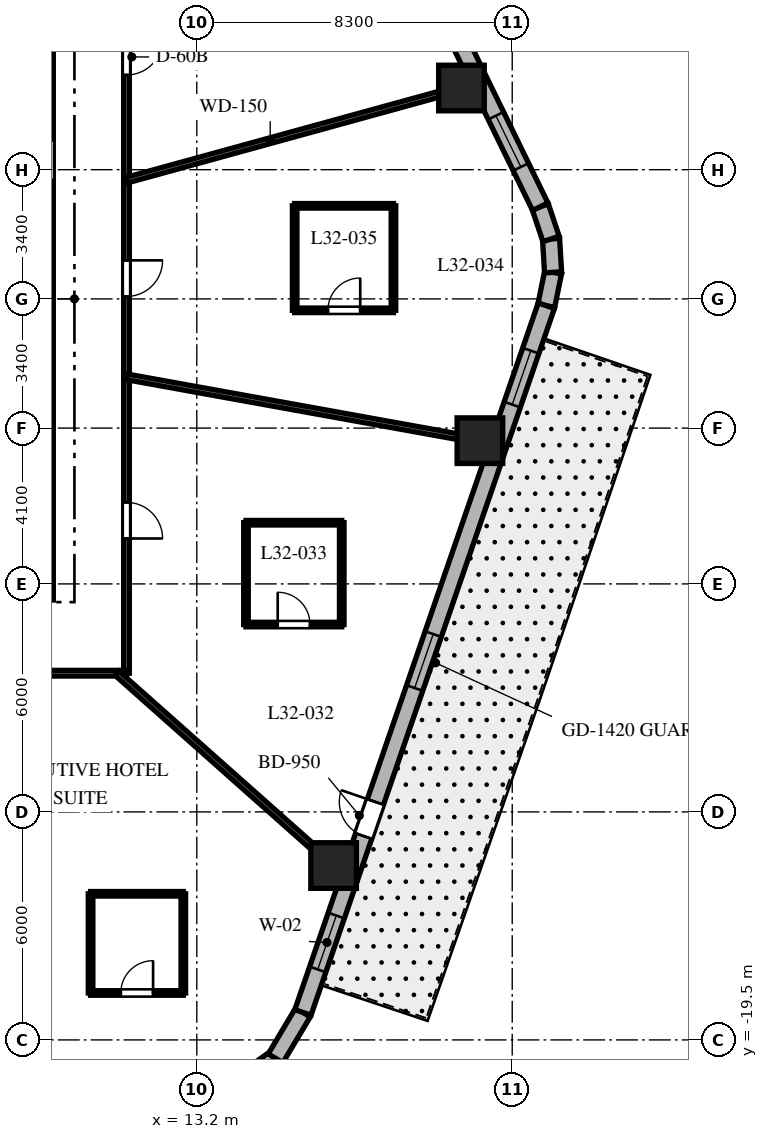
"""IFC4 building model, lengths in metres.
Left out: names, types, materials, properties, quantities, classifications, styles, units other than length and angle.
Written with IfcOpenShell. Run it as: python <this file> out.ifc"""

import sys

from ifc_helpers import new_model, si_unit, direction, frame, frame_2d, origin, origin_2d, place, context, subcontext, project, spatial, rectangle, extrude, element, fill, save


model = new_model("IFC4")
c1 = context("Model", 3, precision=1e-05, world=origin(), true_north=direction((0.0, 1.0)))
c2 = subcontext(c1, "Body", "Model", "MODEL_VIEW")
j1 = project(units=[si_unit("LENGTHUNIT", "METRE"), si_unit("PLANEANGLEUNIT", "RADIAN")], contexts=[c1])
p1 = place(None, origin())
s1 = spatial("IfcSite", under=j1, at=p1, CompositionType="ELEMENT")
p2 = place(p1, origin())
s2 = spatial("IfcBuilding", under=s1, at=p2, CompositionType="ELEMENT")
p3 = place(p2, frame((0.0, 0.0, 132.1)))
s3 = spatial("IfcBuildingStorey", under=s2, at=p3, CompositionType="ELEMENT", Elevation=132.1)
p4 = place(p3, frame((-9.425, -7.5, 0.0), z_axis=(0.0, 0.0, 1.0), x_axis=(1.0, 0.0, 0.0)))
e1 = element("IfcWall", 1, at=p4, inside=s3, PredefinedType="SHEAR", context=c2, shape_type="SweptSolid", body=[
    extrude(rectangle(XDim=18.85, YDim=0.85, at=frame_2d((9.425, 0.0))), origin(), (0.0, 0.0, 1.0), 3.7),
])
p5 = place(p4, frame((9.475, 0.0, 0.0)))
e2 = element("IfcOpeningElement", 2, at=p5, cuts=e1, PredefinedType="OPENING", context=c2, shape_type="SweptSolid", body=[
    extrude(rectangle(XDim=1.0, YDim=2.15, at=frame_2d((0.5, 1.075))), frame((0.0, 0.435, 0.0), z_axis=(0.0, -1.0, 0.0), x_axis=(1.0, 0.0, 0.0)), (0.0, 0.0, 1.0), 0.87),
])
p6 = place(p3, frame((9.0, -7.075, 0.0), z_axis=(0.0, 0.0, 1.0), x_axis=(0.0, 1.0, 0.0)))
e3 = element("IfcWall", 3, at=p6, inside=s3, PredefinedType="SHEAR", context=c2, shape_type="SweptSolid", body=[
    extrude(rectangle(XDim=14.15, YDim=0.85, at=frame_2d((7.075, 0.0))), origin(), (0.0, 0.0, 1.0), 3.7),
])
p7 = place(p6, frame((10.2, 0.0, 0.0)))
e4 = element("IfcOpeningElement", 4, at=p7, cuts=e3, PredefinedType="OPENING", context=c2, shape_type="SweptSolid", body=[
    extrude(rectangle(XDim=1.05, YDim=2.15, at=frame_2d((0.525, 1.075))), frame((0.0, 0.435, 0.0), z_axis=(0.0, -1.0, 0.0), x_axis=(1.0, 0.0, 0.0)), (0.0, 0.0, 1.0), 0.87),
])
for number, where, z_axis, x_axis in (
    (5, (16.8, -14.911, 0.0), (0.0, 0.0, 1.0), (1.0, 0.0, 0.0)),
    (6, (20.65, -3.731, 0.0), (0.0, 0.0, 1.0), (1.0, 0.0, 0.0)),
    (7, (20.164, 5.549, 0.0), (0.0, 0.0, 1.0), (1.0, 0.0, 0.0)),
):
    element("IfcColumn", number, at=place(p3, frame(where, z_axis=z_axis, x_axis=x_axis)), inside=s3, PredefinedType="COLUMN", context=c2, shape_type="SweptSolid", body=[
        extrude(rectangle(XDim=1.2, YDim=1.2, at=origin_2d()), origin(), (0.0, 0.0, 1.0), 3.7),
    ])
p8 = place(p3, frame((14.146, -20.787, 0.0), z_axis=(0.0, 0.0, 1.0), x_axis=(0.814162929117, 0.580636482536, 0.0)))
e8 = element("IfcWall", 8, at=p8, inside=s3, PredefinedType="SOLIDWALL", context=c2, shape_type="SweptSolid", body=[
    extrude(rectangle(XDim=1.382, YDim=0.45, at=frame_2d((0.691, 0.0))), origin(), (0.0, 0.0, 1.0), 3.4),
])
p9 = place(p3, frame((15.272, -19.984, 0.0), z_axis=(0.0, 0.0, 1.0), x_axis=(0.512579347361, 0.858639862025, 0.0)))
e9 = element("IfcWall", 9, at=p9, inside=s3, PredefinedType="SOLIDWALL", context=c2, shape_type="SweptSolid", body=[
    extrude(rectangle(XDim=1.406, YDim=0.45, at=frame_2d((0.703, 0.0))), origin(), (0.0, 0.0, 1.0), 3.4),
])
p10 = place(p3, frame((22.397, -0.179, 0.0), z_axis=(0.0, 0.0, 1.0), x_axis=(0.199313589404, 0.979935759669, 0.0)))
e10 = element("IfcWall", 10, at=p10, inside=s3, PredefinedType="SOLIDWALL", context=c2, shape_type="SweptSolid", body=[
    extrude(rectangle(XDim=0.896, YDim=0.45, at=frame_2d((0.448, 0.0))), origin(), (0.0, 0.0, 1.0), 3.4),
])
p11 = place(p3, frame((22.575, 0.698, 0.0), z_axis=(0.0, 0.0, 1.0), x_axis=(-0.060980441946, 0.998138961117, 0.0)))
e11 = element("IfcWall", 11, at=p11, inside=s3, PredefinedType="SOLIDWALL", context=c2, shape_type="SweptSolid", body=[
    extrude(rectangle(XDim=0.881, YDim=0.45, at=frame_2d((0.44, 0.0))), origin(), (0.0, 0.0, 1.0), 3.4),
])
p12 = place(p3, frame((22.522, 1.577, 0.0), z_axis=(0.0, 0.0, 1.0), x_axis=(-0.317372694837, 0.948300887151, 0.0)))
e12 = element("IfcWall", 12, at=p12, inside=s3, PredefinedType="SOLIDWALL", context=c2, shape_type="SweptSolid", body=[
    extrude(rectangle(XDim=0.896, YDim=0.45, at=frame_2d((0.448, 0.0))), origin(), (0.0, 0.0, 1.0), 3.4),
])
p13 = place(p3, frame((15.992, -18.777, 0.0), z_axis=(0.0, 0.0, 1.0), x_axis=(0.325606988926, 0.945505202927, 0.0)))
e13 = element("IfcWall", 13, at=p13, inside=s3, PredefinedType="SOLIDWALL", context=c2, shape_type="SweptSolid", body=[
    extrude(rectangle(XDim=19.669, YDim=0.45, at=frame_2d((9.835, 0.0))), origin(), (0.0, 0.0, 1.0), 3.4),
])
p14 = place(p13, frame((4.909, 0.0, 0.0)))
e14 = element("IfcOpeningElement", 14, at=p14, cuts=e13, PredefinedType="OPENING", context=c2, shape_type="SweptSolid", body=[
    extrude(rectangle(XDim=0.95, YDim=2.15, at=frame_2d((0.475, 1.075))), frame((0.0, 0.235, 0.0), z_axis=(0.0, -1.0, 0.0), x_axis=(1.0, 0.0, 0.0)), (0.0, 0.0, 1.0), 0.47),
])
p15 = place(p13, frame((1.197, 0.0, 0.8)))
e15 = element("IfcOpeningElement", 15, at=p15, cuts=e13, PredefinedType="OPENING", context=c2, shape_type="SweptSolid", body=[
    extrude(rectangle(XDim=1.5, YDim=1.8, at=frame_2d((0.75, 0.9))), frame((0.0, 0.235, 0.0), z_axis=(0.0, -1.0, 0.0), x_axis=(1.0, 0.0, 0.0)), (0.0, 0.0, 1.0), 0.47),
])
p16 = place(p13, frame((9.03, 0.0, 0.8)))
e16 = element("IfcOpeningElement", 16, at=p16, cuts=e13, PredefinedType="OPENING", context=c2, shape_type="SweptSolid", body=[
    extrude(rectangle(XDim=1.5, YDim=1.8, at=frame_2d((0.75, 0.9))), frame((0.0, 0.235, 0.0), z_axis=(0.0, -1.0, 0.0), x_axis=(1.0, 0.0, 0.0)), (0.0, 0.0, 1.0), 0.47),
])
p17 = place(p13, frame((16.918, 0.0, 0.8)))
e17 = element("IfcOpeningElement", 17, at=p17, cuts=e13, PredefinedType="OPENING", context=c2, shape_type="SweptSolid", body=[
    extrude(rectangle(XDim=1.5, YDim=1.8, at=frame_2d((0.75, 0.9))), frame((0.0, 0.235, 0.0), z_axis=(0.0, -1.0, 0.0), x_axis=(1.0, 0.0, 0.0)), (0.0, 0.0, 1.0), 0.47),
])
p18 = place(p3, frame((22.238, 2.427, 0.0), z_axis=(0.0, 0.0, 1.0), x_axis=(-0.438374803278, 0.898792262901, 0.0)))
e18 = element("IfcWall", 18, at=p18, inside=s3, PredefinedType="SOLIDWALL", context=c2, shape_type="SweptSolid", body=[
    extrude(rectangle(XDim=18.618, YDim=0.45, at=frame_2d((9.309, 0.0))), origin(), (0.0, 0.0, 1.0), 3.4),
])
p19 = place(p18, frame((8.61, 0.0, 0.8)))
e19 = element("IfcOpeningElement", 19, at=p19, cuts=e18, PredefinedType="OPENING", context=c2, shape_type="SweptSolid", body=[
    extrude(rectangle(XDim=1.5, YDim=1.8, at=frame_2d((0.75, 0.9))), frame((0.0, 0.235, 0.0), z_axis=(0.0, -1.0, 0.0), x_axis=(1.0, 0.0, 0.0)), (0.0, 0.0, 1.0), 0.47),
])
p20 = place(p18, frame((16.006, 0.0, 0.8)))
e20 = element("IfcOpeningElement", 20, at=p20, cuts=e18, PredefinedType="OPENING", context=c2, shape_type="SweptSolid", body=[
    extrude(rectangle(XDim=1.5, YDim=1.8, at=frame_2d((0.75, 0.9))), frame((0.0, 0.235, 0.0), z_axis=(0.0, -1.0, 0.0), x_axis=(1.0, 0.0, 0.0)), (0.0, 0.0, 1.0), 0.47),
])
p21 = place(p18, frame((1.163, 0.0, 0.8)))
e21 = element("IfcOpeningElement", 21, at=p21, cuts=e18, PredefinedType="OPENING", context=c2, shape_type="SweptSolid", body=[
    extrude(rectangle(XDim=1.5, YDim=1.8, at=frame_2d((0.75, 0.9))), frame((0.0, 0.235, 0.0), z_axis=(0.0, -1.0, 0.0), x_axis=(1.0, 0.0, 0.0)), (0.0, 0.0, 1.0), 0.47),
])
p22 = place(p3, frame((11.35, 9.85, 0.0), z_axis=(0.0, 0.0, 1.0), x_axis=(0.0, -1.0, 0.0)))
e22 = element("IfcWall", 22, at=p22, inside=s3, PredefinedType="PARTITIONING", context=c2, shape_type="SweptSolid", body=[
    extrude(rectangle(XDim=19.7, YDim=0.15, at=frame_2d((9.85, 0.0))), origin(), (0.0, 0.0, 1.0), 2.84),
])
p23 = place(p22, frame((3.008, 0.0, 0.0)))
e23 = element("IfcOpeningElement", 23, at=p23, cuts=e22, PredefinedType="OPENING", context=c2, shape_type="SweptSolid", body=[
    extrude(rectangle(XDim=0.95, YDim=2.03, at=frame_2d((0.475, 1.015))), frame((0.0, 0.085, 0.0), z_axis=(0.0, -1.0, 0.0), x_axis=(1.0, 0.0, 0.0)), (0.0, 0.0, 1.0), 0.17),
])
p24 = place(p22, frame((15.205, 0.0, 0.0)))
e24 = element("IfcOpeningElement", 24, at=p24, cuts=e22, PredefinedType="OPENING", context=c2, shape_type="SweptSolid", body=[
    extrude(rectangle(XDim=0.95, YDim=2.03, at=frame_2d((0.475, 1.015))), frame((0.0, 0.085, 0.0), z_axis=(0.0, -1.0, 0.0), x_axis=(1.0, 0.0, 0.0)), (0.0, 0.0, 1.0), 0.17),
])
p25 = place(p22, frame((8.836, 0.0, 0.0)))
e25 = element("IfcOpeningElement", 25, at=p25, cuts=e22, PredefinedType="OPENING", context=c2, shape_type="SweptSolid", body=[
    extrude(rectangle(XDim=0.95, YDim=2.03, at=frame_2d((0.475, 1.015))), frame((0.0, 0.085, 0.0), z_axis=(0.0, -1.0, 0.0), x_axis=(1.0, 0.0, 0.0)), (0.0, 0.0, 1.0), 0.17),
])
p26 = place(p3, frame((11.35, -9.85, 0.0), z_axis=(0.0, 0.0, 1.0), x_axis=(-1.0, 0.0, 0.0)))
e26 = element("IfcWall", 26, at=p26, inside=s3, PredefinedType="PARTITIONING", context=c2, shape_type="SweptSolid", body=[
    extrude(rectangle(XDim=22.7, YDim=0.15, at=frame_2d((11.35, 0.0))), origin(), (0.0, 0.0, 1.0), 2.84),
])
p27 = place(p26, frame((17.237, 0.0, 0.0)))
e27 = element("IfcOpeningElement", 27, at=p27, cuts=e26, PredefinedType="OPENING", context=c2, shape_type="SweptSolid", body=[
    extrude(rectangle(XDim=0.95, YDim=2.03, at=frame_2d((0.475, 1.015))), frame((0.0, 0.085, 0.0), z_axis=(0.0, -1.0, 0.0), x_axis=(1.0, 0.0, 0.0)), (0.0, 0.0, 1.0), 0.17),
])
p28 = place(p26, frame((10.45, 0.0, 0.0)))
e28 = element("IfcOpeningElement", 28, at=p28, cuts=e26, PredefinedType="OPENING", context=c2, shape_type="SweptSolid", body=[
    extrude(rectangle(XDim=0.95, YDim=2.03, at=frame_2d((0.475, 1.015))), frame((0.0, 0.085, 0.0), z_axis=(0.0, -1.0, 0.0), x_axis=(1.0, 0.0, 0.0)), (0.0, 0.0, 1.0), 0.17),
])
p29 = place(p26, frame((3.399, 0.0, 0.0)))
e29 = element("IfcOpeningElement", 29, at=p29, cuts=e26, PredefinedType="OPENING", context=c2, shape_type="SweptSolid", body=[
    extrude(rectangle(XDim=0.95, YDim=2.03, at=frame_2d((0.475, 1.015))), frame((0.0, 0.085, 0.0), z_axis=(0.0, -1.0, 0.0), x_axis=(1.0, 0.0, 0.0)), (0.0, 0.0, 1.0), 0.17),
])
p30 = place(p3, frame((11.35, 3.123, 0.0), z_axis=(0.0, 0.0, 1.0), x_axis=(0.964151983214, 0.265350623261, 0.0)))
e30 = element("IfcWall", 30, at=p30, inside=s3, PredefinedType="PARTITIONING", context=c2, shape_type="SweptSolid", body=[
    extrude(rectangle(XDim=9.645, YDim=0.15, at=frame_2d((4.823, 0.0))), origin(), (0.0, 0.0, 1.0), 2.54),
])
p31 = place(p3, frame((11.098, -9.85, 0.0), z_axis=(0.0, 0.0, 1.0), x_axis=(0.747904295103, -0.663806572253, 0.0)))
e31 = element("IfcWall", 31, at=p31, inside=s3, PredefinedType="PARTITIONING", context=c2, shape_type="SweptSolid", body=[
    extrude(rectangle(XDim=8.16, YDim=0.15, at=frame_2d((4.08, 0.0))), origin(), (0.0, 0.0, 1.0), 2.54),
])
p32 = place(p3, frame((11.35, -2.051, 0.0), z_axis=(0.0, 0.0, 1.0), x_axis=(0.984068313063, -0.177790762484, 0.0)))
e32 = element("IfcWall", 32, at=p32, inside=s3, PredefinedType="PARTITIONING", context=c2, shape_type="SweptSolid", body=[
    extrude(rectangle(XDim=9.951, YDim=0.15, at=frame_2d((4.976, 0.0))), origin(), (0.0, 0.0, 1.0), 2.54),
])
p33 = place(p3, frame((10.405, -18.265, 0.0), z_axis=(0.0, 0.0, 1.0), x_axis=(1.0, 0.0, 0.0)))
e33 = element("IfcWall", 33, at=p33, inside=s3, PredefinedType="PARTITIONING", context=c2, shape_type="SweptSolid", body=[
    extrude(rectangle(XDim=2.44, YDim=0.12, at=frame_2d((1.22, 0.0))), origin(), (0.0, 0.0, 1.0), 2.54),
])
p34 = place(p33, frame((0.795, 0.0, 0.0)))
e34 = element("IfcOpeningElement", 34, at=p34, cuts=e33, PredefinedType="OPENING", context=c2, shape_type="SweptSolid", body=[
    extrude(rectangle(XDim=0.85, YDim=2.03, at=frame_2d((0.425, 1.015))), frame((0.0, 0.07, 0.0), z_axis=(0.0, -1.0, 0.0), x_axis=(1.0, 0.0, 0.0)), (0.0, 0.0, 1.0), 0.14),
])
p35 = place(p3, frame((12.845, -18.265, 0.0), z_axis=(0.0, 0.0, 1.0), x_axis=(0.0, 1.0, 0.0)))
e35 = element("IfcWall", 35, at=p35, inside=s3, PredefinedType="PARTITIONING", context=c2, shape_type="SweptSolid", body=[
    extrude(rectangle(XDim=2.61, YDim=0.12, at=frame_2d((1.305, 0.0))), origin(), (0.0, 0.0, 1.0), 2.54),
])
p36 = place(p3, frame((12.845, -15.655, 0.0), z_axis=(0.0, 0.0, 1.0), x_axis=(-1.0, 0.0, 0.0)))
e36 = element("IfcWall", 36, at=p36, inside=s3, PredefinedType="PARTITIONING", context=c2, shape_type="SweptSolid", body=[
    extrude(rectangle(XDim=2.44, YDim=0.12, at=frame_2d((1.22, 0.0))), origin(), (0.0, 0.0, 1.0), 3.4),
])
p37 = place(p3, frame((10.405, -15.655, 0.0), z_axis=(0.0, 0.0, 1.0), x_axis=(0.0, -1.0, 0.0)))
e37 = element("IfcWall", 37, at=p37, inside=s3, PredefinedType="PARTITIONING", context=c2, shape_type="SweptSolid", body=[
    extrude(rectangle(XDim=2.61, YDim=0.12, at=frame_2d((1.305, 0.0))), origin(), (0.0, 0.0, 1.0), 3.4),
])
p38 = place(p3, frame((14.494, -8.57, 0.0), z_axis=(0.0, 0.0, 1.0), x_axis=(1.0, 0.0, 0.0)))
e38 = element("IfcWall", 38, at=p38, inside=s3, PredefinedType="PARTITIONING", context=c2, shape_type="SweptSolid", body=[
    extrude(rectangle(XDim=2.52, YDim=0.12, at=frame_2d((1.26, 0.0))), origin(), (0.0, 0.0, 1.0), 2.972),
])
p39 = place(p38, frame((0.835, 0.0, 0.0)))
e39 = element("IfcOpeningElement", 39, at=p39, cuts=e38, PredefinedType="OPENING", context=c2, shape_type="SweptSolid", body=[
    extrude(rectangle(XDim=0.85, YDim=2.03, at=frame_2d((0.425, 1.015))), frame((0.0, 0.07, 0.0), z_axis=(0.0, -1.0, 0.0), x_axis=(1.0, 0.0, 0.0)), (0.0, 0.0, 1.0), 0.14),
])
p40 = place(p3, frame((17.014, -8.57, 0.0), z_axis=(0.0, 0.0, 1.0), x_axis=(0.0, 1.0, 0.0)))
e40 = element("IfcWall", 40, at=p40, inside=s3, PredefinedType="PARTITIONING", context=c2, shape_type="SweptSolid", body=[
    extrude(rectangle(XDim=2.68, YDim=0.12, at=frame_2d((1.34, 0.0))), origin(), (0.0, 0.0, 1.0), 3.4),
])
p41 = place(p3, frame((17.014, -5.89, 0.0), z_axis=(0.0, 0.0, 1.0), x_axis=(-1.0, 0.0, 0.0)))
e41 = element("IfcWall", 41, at=p41, inside=s3, PredefinedType="PARTITIONING", context=c2, shape_type="SweptSolid", body=[
    extrude(rectangle(XDim=2.52, YDim=0.12, at=frame_2d((1.26, 0.0))), origin(), (0.0, 0.0, 1.0), 2.84),
])
p42 = place(p3, frame((14.494, -5.89, 0.0), z_axis=(0.0, 0.0, 1.0), x_axis=(0.0, -1.0, 0.0)))
e42 = element("IfcWall", 42, at=p42, inside=s3, PredefinedType="PARTITIONING", context=c2, shape_type="SweptSolid", body=[
    extrude(rectangle(XDim=2.68, YDim=0.12, at=frame_2d((1.34, 0.0))), origin(), (0.0, 0.0, 1.0), 3.4),
])
p43 = place(p3, frame((15.775, -0.301, 0.0), z_axis=(0.0, 0.0, 1.0), x_axis=(1.0, 0.0, 0.0)))
e43 = element("IfcWall", 43, at=p43, inside=s3, PredefinedType="PARTITIONING", context=c2, shape_type="SweptSolid", body=[
    extrude(rectangle(XDim=2.6, YDim=0.12, at=frame_2d((1.3, 0.0))), origin(), (0.0, 0.0, 1.0), 2.84),
])
p44 = place(p43, frame((0.875, 0.0, 0.0)))
e44 = element("IfcOpeningElement", 44, at=p44, cuts=e43, PredefinedType="OPENING", context=c2, shape_type="SweptSolid", body=[
    extrude(rectangle(XDim=0.85, YDim=2.03, at=frame_2d((0.425, 1.015))), frame((0.0, 0.07, 0.0), z_axis=(0.0, -1.0, 0.0), x_axis=(1.0, 0.0, 0.0)), (0.0, 0.0, 1.0), 0.14),
])
p45 = place(p3, frame((18.375, -0.301, 0.0), z_axis=(0.0, 0.0, 1.0), x_axis=(0.0, 1.0, 0.0)))
e45 = element("IfcWall", 45, at=p45, inside=s3, PredefinedType="PARTITIONING", context=c2, shape_type="SweptSolid", body=[
    extrude(rectangle(XDim=2.75, YDim=0.12, at=frame_2d((1.375, 0.0))), origin(), (0.0, 0.0, 1.0), 3.4),
])
p46 = place(p3, frame((18.375, 2.449, 0.0), z_axis=(0.0, 0.0, 1.0), x_axis=(-1.0, 0.0, 0.0)))
e46 = element("IfcWall", 46, at=p46, inside=s3, PredefinedType="PARTITIONING", context=c2, shape_type="SweptSolid", body=[
    extrude(rectangle(XDim=2.6, YDim=0.12, at=frame_2d((1.3, 0.0))), origin(), (0.0, 0.0, 1.0), 2.84),
])
p47 = place(p3, frame((15.775, 2.449, 0.0), z_axis=(0.0, 0.0, 1.0), x_axis=(0.0, -1.0, 0.0)))
e47 = element("IfcWall", 47, at=p47, inside=s3, PredefinedType="PARTITIONING", context=c2, shape_type="SweptSolid", body=[
    extrude(rectangle(XDim=2.75, YDim=0.12, at=frame_2d((1.375, 0.0))), origin(), (0.0, 0.0, 1.0), 3.4),
])
p48 = place(p14, origin())
e48 = element("IfcDoor", 48, at=p48, inside=s3, OperationType="SINGLE_SWING_RIGHT", PredefinedType="DOOR", context=c2, shape_type="SweptSolid", body=[
    extrude(rectangle(XDim=0.95, YDim=2.15, at=frame_2d((0.475, 1.075))), frame((0.0, 0.025, 0.0), z_axis=(0.0, -1.0, 0.0), x_axis=(1.0, 0.0, 0.0)), (0.0, 0.0, 1.0), 0.05),
])
fill(e14, e48)
p49 = place(p15, origin())
e49 = element("IfcWindow", 49, at=p49, inside=s3, PartitioningType="SINGLE_PANEL", PredefinedType="WINDOW", context=c2, shape_type="SweptSolid", body=[
    extrude(rectangle(XDim=1.5, YDim=1.8, at=frame_2d((0.75, 0.9))), frame((0.0, 0.03, 0.0), z_axis=(0.0, -1.0, 0.0), x_axis=(1.0, 0.0, 0.0)), (0.0, 0.0, 1.0), 0.06),
])
fill(e15, e49)
p50 = place(p16, origin())
e50 = element("IfcWindow", 50, at=p50, inside=s3, PartitioningType="SINGLE_PANEL", PredefinedType="WINDOW", context=c2, shape_type="SweptSolid", body=[
    extrude(rectangle(XDim=1.5, YDim=1.8, at=frame_2d((0.75, 0.9))), frame((0.0, 0.03, 0.0), z_axis=(0.0, -1.0, 0.0), x_axis=(1.0, 0.0, 0.0)), (0.0, 0.0, 1.0), 0.06),
])
fill(e16, e50)
p51 = place(p17, origin())
e51 = element("IfcWindow", 51, at=p51, inside=s3, PartitioningType="SINGLE_PANEL", PredefinedType="WINDOW", context=c2, shape_type="SweptSolid", body=[
    extrude(rectangle(XDim=1.5, YDim=1.8, at=frame_2d((0.75, 0.9))), frame((0.0, 0.03, 0.0), z_axis=(0.0, -1.0, 0.0), x_axis=(1.0, 0.0, 0.0)), (0.0, 0.0, 1.0), 0.06),
])
fill(e17, e51)
p52 = place(p21, origin())
e52 = element("IfcWindow", 52, at=p52, inside=s3, PartitioningType="SINGLE_PANEL", PredefinedType="WINDOW", context=c2, shape_type="SweptSolid", body=[
    extrude(rectangle(XDim=1.5, YDim=1.8, at=frame_2d((0.75, 0.9))), frame((0.0, 0.03, 0.0), z_axis=(0.0, -1.0, 0.0), x_axis=(1.0, 0.0, 0.0)), (0.0, 0.0, 1.0), 0.06),
])
fill(e21, e52)
p53 = place(p23, origin())
e53 = element("IfcDoor", 53, at=p53, inside=s3, OperationType="SINGLE_SWING_LEFT", PredefinedType="DOOR", context=c2, shape_type="SweptSolid", body=[
    extrude(rectangle(XDim=0.95, YDim=2.03, at=frame_2d((0.475, 1.015))), frame((0.0, 0.025, 0.0), z_axis=(0.0, -1.0, 0.0), x_axis=(1.0, 0.0, 0.0)), (0.0, 0.0, 1.0), 0.05),
])
fill(e23, e53)
p54 = place(p34, origin())
e54 = element("IfcDoor", 54, at=p54, inside=s3, OperationType="SINGLE_SWING_RIGHT", PredefinedType="DOOR", context=c2, shape_type="SweptSolid", body=[
    extrude(rectangle(XDim=0.85, YDim=2.03, at=frame_2d((0.425, 1.015))), frame((0.0, 0.025, 0.0), z_axis=(0.0, -1.0, 0.0), x_axis=(1.0, 0.0, 0.0)), (0.0, 0.0, 1.0), 0.05),
])
fill(e34, e54)
p55 = place(p24, origin())
e55 = element("IfcDoor", 55, at=p55, inside=s3, OperationType="SINGLE_SWING_RIGHT", PredefinedType="DOOR", context=c2, shape_type="SweptSolid", body=[
    extrude(rectangle(XDim=0.95, YDim=2.03, at=frame_2d((0.475, 1.015))), frame((0.0, 0.025, 0.0), z_axis=(0.0, -1.0, 0.0), x_axis=(1.0, 0.0, 0.0)), (0.0, 0.0, 1.0), 0.05),
])
fill(e24, e55)
p56 = place(p39, origin())
e56 = element("IfcDoor", 56, at=p56, inside=s3, OperationType="SINGLE_SWING_LEFT", PredefinedType="DOOR", context=c2, shape_type="SweptSolid", body=[
    extrude(rectangle(XDim=0.85, YDim=2.03, at=frame_2d((0.425, 1.015))), frame((0.0, 0.025, 0.0), z_axis=(0.0, -1.0, 0.0), x_axis=(1.0, 0.0, 0.0)), (0.0, 0.0, 1.0), 0.05),
])
fill(e39, e56)
p57 = place(p25, origin())
e57 = element("IfcDoor", 57, at=p57, inside=s3, OperationType="SINGLE_SWING_LEFT", PredefinedType="DOOR", context=c2, shape_type="SweptSolid", body=[
    extrude(rectangle(XDim=0.95, YDim=2.03, at=frame_2d((0.475, 1.015))), frame((0.0, 0.025, 0.0), z_axis=(0.0, -1.0, 0.0), x_axis=(1.0, 0.0, 0.0)), (0.0, 0.0, 1.0), 0.05),
])
fill(e25, e57)
p58 = place(p44, origin())
e58 = element("IfcDoor", 58, at=p58, inside=s3, OperationType="SINGLE_SWING_RIGHT", PredefinedType="DOOR", context=c2, shape_type="SweptSolid", body=[
    extrude(rectangle(XDim=0.85, YDim=2.03, at=frame_2d((0.425, 1.015))), frame((0.0, 0.025, 0.0), z_axis=(0.0, -1.0, 0.0), x_axis=(1.0, 0.0, 0.0)), (0.0, 0.0, 1.0), 0.05),
])
fill(e44, e58)
save(model, sys.argv[1])
